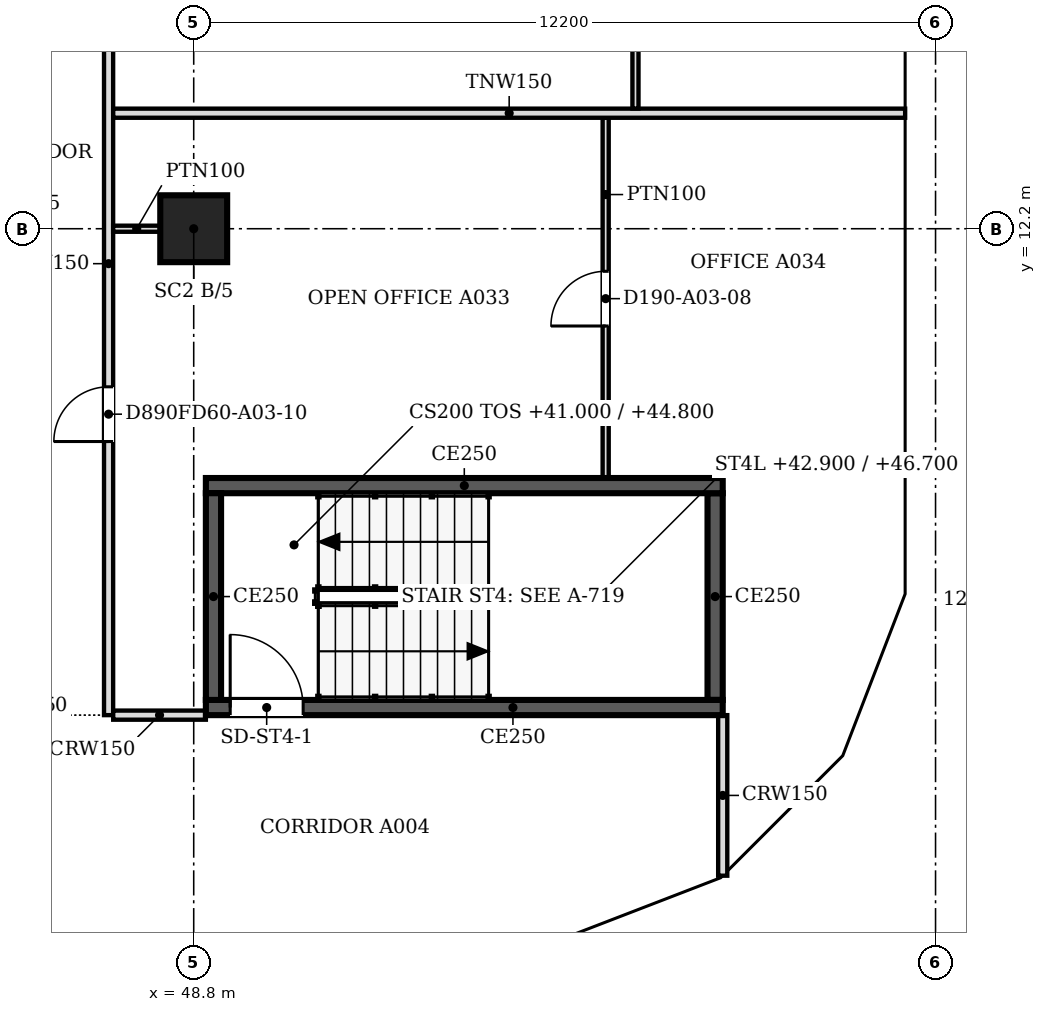
"""IFC4 building model, lengths in metres.
Left out: names, types, materials, properties, quantities, classifications, styles, units other than length and angle.
Written with IfcOpenShell. Run it as: python <this file> out.ifc"""

import sys

from ifc_helpers import new_model, si_unit, direction, frame, frame_2d, origin, origin_2d, place, context, subcontext, project, spatial, polyline, rectangle, outline, extrude, faceted_brep, source, transform, mapped, element, fill, save


model = new_model("IFC4")
c1 = context("Model", 3, precision=1e-05, world=origin(), true_north=direction((0.0, 1.0)))
c2 = subcontext(c1, "Body", "Model", "MODEL_VIEW")
j1 = project(units=[si_unit("LENGTHUNIT", "METRE"), si_unit("PLANEANGLEUNIT", "RADIAN")], contexts=[c1])
p1 = place(None, origin())
s1 = spatial("IfcSite", under=j1, at=p1, CompositionType="ELEMENT")
p2 = place(p1, origin())
s2 = spatial("IfcBuilding", under=s1, at=p2, CompositionType="ELEMENT")
p3 = place(p2, frame((0.0, 0.0, 41.0)))
s3 = spatial("IfcBuildingStorey", under=s2, at=p3, CompositionType="ELEMENT", Elevation=41.0)
p4 = place(p3, frame((48.8, 12.2, 0.0), z_axis=(0.0, 0.0, 1.0), x_axis=(1.0, 0.0, 0.0)))
e1 = element("IfcColumn", 1, at=p4, inside=s3, PredefinedType="COLUMN", context=c2, shape_type="SweptSolid", body=[
    extrude(rectangle(XDim=1.1, YDim=1.1, at=origin_2d()), origin(), (0.0, 0.0, 1.0), 3.6),
])
m1 = source(origin(), c2, "Body", "Brep", [
    faceted_brep([(0.047, -0.25, 0.0), (2.997, -0.25, 3.8), (0.047, -0.25, 7.6), (0.0, -0.25, 7.541), (0.0, -0.25, 0.059), (0.093, 0.25, 7.54), (2.944, 0.25, 3.868), (2.944, 0.25, 3.732), (0.093, 0.25, 0.06), (2.997, 0.0, 3.8), (0.047, 0.0, 0.0), (0.047, 0.0, 7.6)], [[[0, 1, 2, 3, 4]], [[5, 6, 7, 8]], [[8, 7, 9, 1, 0, 10]], [[6, 5, 11, 2, 1, 9]], [[3, 2, 11]], [[10, 0, 4]], [[8, 10, 4, 3, 11, 5]], [[9, 7, 6]]]),
])
p5 = place(p3, frame((54.81, 0.233, -3.8), z_axis=(0.0, 0.0, 1.0), x_axis=(0.932990326376, 0.359901446078, 0.0)))
e2 = element("IfcWall", 2, at=p5, inside=s3, PredefinedType="SOLIDWALL", context=c2, shape_type="MappedRepresentation", body=[
    mapped(m1, transform((0.0, 0.0, 0.0), scale=1.0)),
])
m2 = source(origin(), c2, "Body", "SweptSolid", [
    extrude(outline(polyline([(0.247, 0.665), (2.681, 3.8), (0.247, 6.935), (0.247, 0.665)])), frame((0.0, 0.26, 0.0), z_axis=(0.0, -1.0, 0.0), x_axis=(1.0, 0.0, 0.0)), (0.0, 0.0, 1.0), 0.52),
])
p6 = place(p5, origin())
e3 = element("IfcOpeningElement", 3, at=p6, cuts=e2, PredefinedType="OPENING", context=c2, shape_type="MappedRepresentation", body=[
    mapped(m2, transform((0.0, 0.0, 0.0), scale=1.0)),
])
m3 = source(origin(), c2, "Body", "Brep", [
    faceted_brep([(2.944, -0.25, 0.0), (2.997, -0.25, 0.068), (2.997, -0.25, 7.532), (2.944, -0.25, 7.6), (0.0, -0.25, 3.8), (0.053, 0.25, 3.868), (2.891, 0.25, 7.532), (2.891, 0.25, 0.068), (0.053, 0.25, 3.732), (2.944, 0.0, 0.0), (2.944, 0.0, 7.6), (0.0, 0.0, 3.8)], [[[0, 1, 2, 3, 4]], [[5, 6, 7, 8]], [[1, 0, 9]], [[10, 3, 2]], [[6, 5, 11, 4, 3, 10]], [[8, 7, 9, 0, 4, 11]], [[8, 11, 5]], [[1, 9, 7, 6, 10, 2]]]),
])
p7 = place(p3, frame((57.606, 1.312, -3.8), z_axis=(0.0, 0.0, 1.0), x_axis=(0.707147509625, 0.707066050402, 0.0)))
e4 = element("IfcWall", 4, at=p7, inside=s3, PredefinedType="SOLIDWALL", context=c2, shape_type="MappedRepresentation", body=[
    mapped(m3, transform((0.0, 0.0, 0.0), scale=1.0)),
])
m4 = source(origin(), c2, "Body", "SweptSolid", [
    extrude(outline(polyline([(2.744, 6.934), (0.316, 3.8), (2.744, 0.666), (2.744, 6.934)])), frame((0.0, 0.26, 0.0), z_axis=(0.0, -1.0, 0.0), x_axis=(1.0, 0.0, 0.0)), (0.0, 0.0, 1.0), 0.52),
])
p8 = place(p7, origin())
e5 = element("IfcOpeningElement", 5, at=p8, cuts=e4, PredefinedType="OPENING", context=c2, shape_type="MappedRepresentation", body=[
    mapped(m4, transform((0.0, 0.0, 0.0), scale=1.0)),
])
m5 = source(origin(), c2, "Body", "Brep", [
    faceted_brep([(0.053, -0.25, 0.0), (3.003, -0.25, 3.8), (0.053, -0.25, 7.6), (0.0, -0.25, 7.532), (0.0, -0.25, 0.068), (0.106, 0.25, 7.532), (2.957, 0.25, 3.86), (2.957, 0.25, 3.74), (0.106, 0.25, 0.068), (3.003, 0.0, 3.8), (0.053, 0.0, 0.0), (0.053, 0.0, 7.6)], [[[0, 1, 2, 3, 4]], [[5, 6, 7, 8]], [[8, 7, 9, 1, 0, 10]], [[6, 5, 11, 2, 1, 9]], [[3, 2, 11]], [[10, 0, 4]], [[8, 10, 4, 3, 11, 5]], [[9, 7, 6]]]),
])
p9 = place(p3, frame((59.669, 3.344, -3.8), z_axis=(0.0, 0.0, 1.0), x_axis=(0.35992665181, 0.932980602862, 0.0)))
e6 = element("IfcWall", 6, at=p9, inside=s3, PredefinedType="SOLIDWALL", context=c2, shape_type="MappedRepresentation", body=[
    mapped(m5, transform((0.0, 0.0, 0.0), scale=1.0)),
])
m6 = source(origin(), c2, "Body", "SweptSolid", [
    extrude(outline(polyline([(0.253, 0.665), (2.687, 3.8), (0.253, 6.935), (0.253, 0.665)])), frame((0.0, 0.26, 0.0), z_axis=(0.0, -1.0, 0.0), x_axis=(1.0, 0.0, 0.0)), (0.0, 0.0, 1.0), 0.52),
])
p10 = place(p9, origin())
e7 = element("IfcOpeningElement", 7, at=p10, cuts=e6, PredefinedType="OPENING", context=c2, shape_type="MappedRepresentation", body=[
    mapped(m6, transform((0.0, 0.0, 0.0), scale=1.0)),
])
m7 = source(origin(), c2, "Body", "Brep", [
    faceted_brep([(3.003, -0.25, 0.0), (6.053, -0.25, 3.8), (3.003, -0.25, 7.6), (0.0, -0.25, 3.8), (0.047, 0.25, 3.859), (3.003, 0.25, 7.6), (6.053, 0.25, 3.8), (3.003, 0.25, 0.0), (0.047, 0.25, 3.741), (0.0, 0.0, 3.8)], [[[0, 1, 2, 3]], [[4, 5, 6, 7, 8]], [[7, 6, 1, 0]], [[6, 5, 2, 1]], [[5, 4, 9, 3, 2]], [[8, 7, 0, 3, 9]], [[8, 9, 4]]]),
])
p11 = place(p3, frame((60.75, 6.146, -3.8), z_axis=(0.0, 0.0, 1.0), x_axis=(0.0, 1.0, 0.0)))
e8 = element("IfcWall", 8, at=p11, inside=s3, PredefinedType="SOLIDWALL", context=c2, shape_type="MappedRepresentation", body=[
    mapped(m7, transform((0.0, 0.0, 0.0), scale=1.0)),
])
m8 = source(origin(), c2, "Body", "SweptSolid", [
    extrude(outline(polyline([(3.005, 0.401), (5.733, 3.8), (3.005, 7.199), (0.319, 3.8), (3.005, 0.401)])), frame((0.0, 0.26, 0.0), z_axis=(0.0, -1.0, 0.0), x_axis=(1.0, 0.0, 0.0)), (0.0, 0.0, 1.0), 0.52),
])
p12 = place(p11, origin())
e9 = element("IfcOpeningElement", 9, at=p12, cuts=e8, PredefinedType="OPENING", context=c2, shape_type="MappedRepresentation", body=[
    mapped(m8, transform((0.0, 0.0, 0.0), scale=1.0)),
])
m9 = source(origin(), c2, "Body", "SweptSolid", [
    extrude(outline(polyline([(3.05, 0.0), (6.1, 3.8), (3.05, 7.6), (0.0, 3.8), (3.05, 0.0)])), frame((0.0, 0.25, 0.0), z_axis=(0.0, -1.0, 0.0), x_axis=(1.0, 0.0, 0.0)), (0.0, 0.0, 1.0), 0.5),
])
p13 = place(p3, frame((60.75, 12.2, -3.8), z_axis=(0.0, 0.0, 1.0), x_axis=(0.0, 1.0, 0.0)))
e10 = element("IfcWall", 10, at=p13, inside=s3, PredefinedType="SOLIDWALL", context=c2, shape_type="MappedRepresentation", body=[
    mapped(m9, transform((0.0, 0.0, 0.0), scale=1.0)),
])
m10 = source(origin(), c2, "Body", "SweptSolid", [
    extrude(outline(polyline([(3.05, 0.399), (5.78, 3.8), (3.05, 7.201), (0.321, 3.8), (3.05, 0.399)])), frame((0.0, 0.26, 0.0), z_axis=(0.0, -1.0, 0.0), x_axis=(1.0, 0.0, 0.0)), (0.0, 0.0, 1.0), 0.52),
])
p14 = place(p13, origin())
e11 = element("IfcOpeningElement", 11, at=p14, cuts=e10, PredefinedType="OPENING", context=c2, shape_type="MappedRepresentation", body=[
    mapped(m10, transform((0.0, 0.0, 0.0), scale=1.0)),
])
p15 = place(p2, frame((0.0, 0.0, 44.8)))
s4 = spatial("IfcBuildingStorey", under=s2, at=p15, CompositionType="ELEMENT", Elevation=44.8)
m11 = source(origin(), c2, "Body", "Brep", [
    faceted_brep([(2.95, -0.25, 0.0), (3.003, -0.25, 0.068), (3.003, -0.25, 7.532), (2.95, -0.25, 7.6), (0.0, -0.25, 3.8), (0.047, 0.25, 3.86), (2.898, 0.25, 7.532), (2.898, 0.25, 0.068), (0.047, 0.25, 3.74), (2.95, 0.0, 0.0), (2.95, 0.0, 7.6), (0.0, 0.0, 3.8)], [[[0, 1, 2, 3, 4]], [[5, 6, 7, 8]], [[1, 0, 9]], [[10, 3, 2]], [[6, 5, 11, 4, 3, 10]], [[8, 7, 9, 0, 4, 11]], [[8, 11, 5]], [[1, 9, 7, 6, 10, 2]]]),
])
p16 = place(p15, frame((54.854, 0.25, -3.8), z_axis=(0.0, 0.0, 1.0), x_axis=(0.932970071518, 0.359953949349, 0.0)))
e12 = element("IfcWall", 12, at=p16, inside=s4, PredefinedType="SOLIDWALL", context=c2, shape_type="MappedRepresentation", body=[
    mapped(m11, transform((0.0, 0.0, 0.0), scale=1.0)),
])
m12 = source(origin(), c2, "Body", "SweptSolid", [
    extrude(outline(polyline([(2.75, 6.935), (0.316, 3.8), (2.75, 0.665), (2.75, 6.935)])), frame((0.0, 0.26, 0.0), z_axis=(0.0, -1.0, 0.0), x_axis=(1.0, 0.0, 0.0)), (0.0, 0.0, 1.0), 0.52),
])
p17 = place(p16, origin())
e13 = element("IfcOpeningElement", 13, at=p17, cuts=e12, PredefinedType="OPENING", context=c2, shape_type="MappedRepresentation", body=[
    mapped(m12, transform((0.0, 0.0, 0.0), scale=1.0)),
])
m13 = source(origin(), c2, "Body", "Brep", [
    faceted_brep([(0.053, -0.25, 0.0), (2.997, -0.25, 3.8), (0.053, -0.25, 7.6), (0.0, -0.25, 7.532), (0.0, -0.25, 0.068), (0.106, 0.25, 7.532), (2.944, 0.25, 3.868), (2.944, 0.25, 3.732), (0.106, 0.25, 0.068), (2.997, 0.0, 3.8), (0.053, 0.0, 0.0), (0.053, 0.0, 7.6)], [[[0, 1, 2, 3, 4]], [[5, 6, 7, 8]], [[8, 7, 9, 1, 0, 10]], [[6, 5, 11, 2, 1, 9]], [[3, 2, 11]], [[10, 0, 4]], [[8, 10, 4, 3, 11, 5]], [[9, 7, 6]]]),
])
p18 = place(p15, frame((57.569, 1.274, -3.8), z_axis=(0.0, 0.0, 1.0), x_axis=(0.707066050402, 0.707147509625, 0.0)))
e14 = element("IfcWall", 14, at=p18, inside=s4, PredefinedType="SOLIDWALL", context=c2, shape_type="MappedRepresentation", body=[
    mapped(m13, transform((0.0, 0.0, 0.0), scale=1.0)),
])
m14 = source(origin(), c2, "Body", "SweptSolid", [
    extrude(outline(polyline([(0.253, 0.666), (2.681, 3.8), (0.253, 6.934), (0.253, 0.666)])), frame((0.0, 0.26, 0.0), z_axis=(0.0, -1.0, 0.0), x_axis=(1.0, 0.0, 0.0)), (0.0, 0.0, 1.0), 0.52),
])
p19 = place(p18, origin())
e15 = element("IfcOpeningElement", 15, at=p19, cuts=e14, PredefinedType="OPENING", context=c2, shape_type="MappedRepresentation", body=[
    mapped(m14, transform((0.0, 0.0, 0.0), scale=1.0)),
])
m15 = source(origin(), c2, "Body", "Brep", [
    faceted_brep([(2.95, -0.25, 0.0), (2.997, -0.25, 0.059), (2.997, -0.25, 7.541), (2.95, -0.25, 7.6), (0.0, -0.25, 3.8), (0.053, 0.25, 3.868), (2.904, 0.25, 7.54), (2.904, 0.25, 0.06), (0.053, 0.25, 3.732), (2.95, 0.0, 0.0), (2.95, 0.0, 7.6), (0.0, 0.0, 3.8)], [[[0, 1, 2, 3, 4]], [[5, 6, 7, 8]], [[1, 0, 9]], [[10, 3, 2]], [[6, 5, 11, 4, 3, 10]], [[8, 7, 9, 0, 4, 11]], [[8, 11, 5]], [[1, 9, 7, 6, 10, 2]]]),
])
p20 = place(p15, frame((59.688, 3.394, -3.8), z_axis=(0.0, 0.0, 1.0), x_axis=(0.359972353723, 0.932962970624, 0.0)))
e16 = element("IfcWall", 16, at=p20, inside=s4, PredefinedType="SOLIDWALL", context=c2, shape_type="MappedRepresentation", body=[
    mapped(m15, transform((0.0, 0.0, 0.0), scale=1.0)),
])
p21 = place(p20, origin())
e17 = element("IfcOpeningElement", 17, at=p21, cuts=e16, PredefinedType="OPENING", context=c2, shape_type="MappedRepresentation", body=[
    mapped(m12, transform((0.0, 0.0, 0.0), scale=1.0)),
])
m16 = source(origin(), c2, "Body", "Brep", [
    faceted_brep([(0.047, -0.25, 0.0), (3.05, -0.25, 3.8), (0.047, -0.25, 7.6), (0.0, -0.25, 7.54), (0.0, -0.25, 0.06), (0.093, 0.25, 7.541), (3.05, 0.25, 3.8), (0.093, 0.25, 0.059), (0.047, 0.0, 0.0), (0.047, 0.0, 7.6)], [[[0, 1, 2, 3, 4]], [[5, 6, 7]], [[7, 6, 1, 0, 8]], [[6, 5, 9, 2, 1]], [[3, 2, 9]], [[8, 0, 4]], [[7, 8, 4, 3, 9, 5]]]),
])
p22 = place(p15, frame((60.75, 6.1, -3.8), z_axis=(0.0, 0.0, 1.0), x_axis=(0.0, 1.0, 0.0)))
e18 = element("IfcWall", 18, at=p22, inside=s4, PredefinedType="SOLIDWALL", context=c2, shape_type="MappedRepresentation", body=[
    mapped(m16, transform((0.0, 0.0, 0.0), scale=1.0)),
])
m17 = source(origin(), c2, "Body", "SweptSolid", [
    extrude(outline(polyline([(0.247, 0.656), (2.731, 3.8), (0.247, 6.944), (0.247, 0.656)])), frame((0.0, 0.26, 0.0), z_axis=(0.0, -1.0, 0.0), x_axis=(1.0, 0.0, 0.0)), (0.0, 0.0, 1.0), 0.52),
])
p23 = place(p22, origin())
e19 = element("IfcOpeningElement", 19, at=p23, cuts=e18, PredefinedType="OPENING", context=c2, shape_type="MappedRepresentation", body=[
    mapped(m17, transform((0.0, 0.0, 0.0), scale=1.0)),
])
p24 = place(p15, frame((60.75, 9.15, -3.8), z_axis=(0.0, 0.0, 1.0), x_axis=(0.0, 1.0, 0.0)))
e20 = element("IfcWall", 20, at=p24, inside=s4, PredefinedType="SOLIDWALL", context=c2, shape_type="MappedRepresentation", body=[
    mapped(m9, transform((0.0, 0.0, 0.0), scale=1.0)),
])
p25 = place(p24, origin())
e21 = element("IfcOpeningElement", 21, at=p25, cuts=e20, PredefinedType="OPENING", context=c2, shape_type="MappedRepresentation", body=[
    mapped(m10, transform((0.0, 0.0, 0.0), scale=1.0)),
])
p26 = place(p3, frame((57.5, 4.325, 0.0), z_axis=(0.0, 0.0, 1.0), x_axis=(-1.0, 0.0, 0.0)))
e22 = element("IfcWall", 22, at=p26, inside=s3, PredefinedType="SOLIDWALL", context=c2, shape_type="SweptSolid", body=[
    extrude(rectangle(XDim=8.5, YDim=0.25, at=frame_2d((4.25, 0.0))), origin(), (0.0, 0.0, 1.0), 3.8),
])
m18 = source(origin(), c2, "Body", "SweptSolid", [
    extrude(rectangle(XDim=1.2, YDim=2.1, at=frame_2d((0.6, 1.05))), frame((0.0, 0.135, 0.0), z_axis=(0.0, -1.0, 0.0), x_axis=(1.0, 0.0, 0.0)), (0.0, 0.0, 1.0), 0.27),
])
p27 = place(p26, frame((6.9, 0.0, 0.0)))
e23 = element("IfcOpeningElement", 23, at=p27, cuts=e22, PredefinedType="OPENING", context=c2, shape_type="MappedRepresentation", body=[
    mapped(m18, transform((0.0, 0.0, 0.0), scale=1.0)),
])
p28 = place(p3, frame((49.125, 4.45, 0.0), z_axis=(0.0, 0.0, 1.0), x_axis=(0.0, 1.0, 0.0)))
e24 = element("IfcWall", 24, at=p28, inside=s3, PredefinedType="SOLIDWALL", context=c2, shape_type="SweptSolid", body=[
    extrude(rectangle(XDim=3.4, YDim=0.25, at=frame_2d((1.7, 0.0))), origin(), (0.0, 0.0, 1.0), 3.8),
])
p29 = place(p3, frame((49.0, 7.975, 0.0), z_axis=(0.0, 0.0, 1.0), x_axis=(1.0, 0.0, 0.0)))
e25 = element("IfcWall", 25, at=p29, inside=s3, PredefinedType="SOLIDWALL", context=c2, shape_type="SweptSolid", body=[
    extrude(rectangle(XDim=8.5, YDim=0.25, at=frame_2d((4.25, 0.0))), origin(), (0.0, 0.0, 1.0), 3.8),
])
p30 = place(p3, frame((57.375, 7.85, 0.0), z_axis=(0.0, 0.0, 1.0), x_axis=(0.0, -1.0, 0.0)))
e26 = element("IfcWall", 26, at=p30, inside=s3, PredefinedType="SOLIDWALL", context=c2, shape_type="SweptSolid", body=[
    extrude(rectangle(XDim=3.4, YDim=0.25, at=frame_2d((1.7, 0.0))), origin(), (0.0, 0.0, 1.0), 3.8),
])
p31 = place(p3, frame((57.5, 1.559, 0.0), z_axis=(0.0, 0.0, 1.0), x_axis=(0.0, 1.0, 0.0)))
e27 = element("IfcWall", 27, at=p31, inside=s3, PredefinedType="PARTITIONING", context=c2, shape_type="SweptSolid", body=[
    extrude(rectangle(XDim=2.641, YDim=0.15, at=frame_2d((1.32, 0.0))), origin(), (0.0, 0.0, 1.0), 3.067),
])
p32 = place(p3, frame((47.4, 22.224, 0.0), z_axis=(0.0, 0.0, 1.0), x_axis=(0.0, -1.0, 0.0)))
e28 = element("IfcWall", 28, at=p32, inside=s3, PredefinedType="PARTITIONING", context=c2, shape_type="SweptSolid", body=[
    extrude(rectangle(XDim=18.024, YDim=0.15, at=frame_2d((9.012, 0.0))), origin(), (0.0, 0.0, 1.0), 3.067),
])
m19 = source(origin(), c2, "Body", "SweptSolid", [
    extrude(rectangle(XDim=0.9, YDim=2.1, at=frame_2d((0.45, 1.05))), frame((0.0, 0.085, 0.0), z_axis=(0.0, -1.0, 0.0), x_axis=(1.0, 0.0, 0.0)), (0.0, 0.0, 1.0), 0.17),
])
p33 = place(p32, frame((3.623, 0.0, 0.0)))
e29 = element("IfcOpeningElement", 29, at=p33, cuts=e28, PredefinedType="OPENING", context=c2, shape_type="MappedRepresentation", body=[
    mapped(m19, transform((0.0, 0.0, 0.0), scale=1.0)),
])
p34 = place(p32, frame((12.624, 0.0, 0.0)))
e30 = element("IfcOpeningElement", 30, at=p34, cuts=e28, PredefinedType="OPENING", context=c2, shape_type="MappedRepresentation", body=[
    mapped(m19, transform((0.0, 0.0, 0.0), scale=1.0)),
])
p35 = place(p3, frame((47.476, 4.2, 0.0), z_axis=(0.0, 0.0, 1.0), x_axis=(1.0, 0.0, 0.0)))
e31 = element("IfcWall", 31, at=p35, inside=s3, PredefinedType="PARTITIONING", context=c2, shape_type="SweptSolid", body=[
    extrude(rectangle(XDim=1.524, YDim=0.15, at=frame_2d((0.762, 0.0))), origin(), (0.0, 0.0, 1.0), 3.067),
])
p36 = place(p3, frame((55.575, 14.024, 0.0), z_axis=(0.0, 0.0, 1.0), x_axis=(0.0, -1.0, 0.0)))
e32 = element("IfcWall", 32, at=p36, inside=s3, PredefinedType="PARTITIONING", context=c2, shape_type="SweptSolid", body=[
    extrude(rectangle(XDim=5.924, YDim=0.1, at=frame_2d((2.962, 0.0))), origin(), (0.0, 0.0, 1.0), 3.067),
])
m20 = source(origin(), c2, "Body", "SweptSolid", [
    extrude(rectangle(XDim=0.9, YDim=2.1, at=frame_2d((0.45, 1.05))), frame((0.0, 0.06, 0.0), z_axis=(0.0, -1.0, 0.0), x_axis=(1.0, 0.0, 0.0)), (0.0, 0.0, 1.0), 0.12),
])
p37 = place(p36, frame((2.524, 0.0, 0.0)))
e33 = element("IfcOpeningElement", 33, at=p37, cuts=e32, PredefinedType="OPENING", context=c2, shape_type="MappedRepresentation", body=[
    mapped(m20, transform((0.0, 0.0, 0.0), scale=1.0)),
])
p38 = place(p3, frame((48.25, 12.2, 0.0), z_axis=(0.0, 0.0, 1.0), x_axis=(-1.0, 0.0, 0.0)))
e34 = element("IfcWall", 34, at=p38, inside=s3, PredefinedType="PARTITIONING", context=c2, shape_type="SweptSolid", body=[
    extrude(rectangle(XDim=0.775, YDim=0.1, at=frame_2d((0.387, 0.0))), origin(), (0.0, 0.0, 1.0), 3.067),
])
p39 = place(p3, frame((47.476, 14.1, 0.0), z_axis=(0.0, 0.0, 1.0), x_axis=(1.0, 0.0, 0.0)))
e35 = element("IfcWall", 35, at=p39, inside=s3, PredefinedType="PARTITIONING", context=c2, shape_type="SweptSolid", body=[
    extrude(rectangle(XDim=13.024, YDim=0.15, at=frame_2d((6.512, 0.0))), origin(), (0.0, 0.0, 1.0), 3.067),
])
p40 = place(p3, frame((56.065, 22.224, 0.0), z_axis=(0.0, 0.0, 1.0), x_axis=(0.0, -1.0, 0.0)))
e36 = element("IfcWall", 36, at=p40, inside=s3, PredefinedType="PARTITIONING", context=c2, shape_type="SweptSolid", body=[
    extrude(rectangle(XDim=8.048, YDim=0.1, at=frame_2d((4.024, 0.0))), origin(), (0.0, 0.0, 1.0), 3.067),
])
p41 = place(p40, frame((3.548, 0.0, 0.0)))
e37 = element("IfcOpeningElement", 37, at=p41, cuts=e36, PredefinedType="OPENING", context=c2, shape_type="MappedRepresentation", body=[
    mapped(m20, transform((0.0, 0.0, 0.0), scale=1.0)),
])
m21 = source(origin(), c2, "Body", "SweptSolid", [
    extrude(rectangle(XDim=1.2, YDim=2.1, at=frame_2d((0.6, 1.05))), frame((0.0, 0.025, 0.0), z_axis=(0.0, -1.0, 0.0), x_axis=(1.0, 0.0, 0.0)), (0.0, 0.0, 1.0), 0.05),
])
p42 = place(p27, origin())
e38 = element("IfcDoor", 38, at=p42, inside=s3, OperationType="SINGLE_SWING_RIGHT", PredefinedType="DOOR", context=c2, shape_type="MappedRepresentation", body=[
    mapped(m21, transform((0.0, 0.0, 0.0), scale=1.0)),
])
fill(e23, e38)
m22 = source(origin(), c2, "Body", "SweptSolid", [
    extrude(rectangle(XDim=0.9, YDim=2.1, at=frame_2d((0.45, 1.05))), frame((0.0, 0.025, 0.0), z_axis=(0.0, -1.0, 0.0), x_axis=(1.0, 0.0, 0.0)), (0.0, 0.0, 1.0), 0.05),
])
p43 = place(p37, origin())
e39 = element("IfcDoor", 39, at=p43, inside=s3, OperationType="SINGLE_SWING_RIGHT", PredefinedType="DOOR", context=c2, shape_type="MappedRepresentation", body=[
    mapped(m22, transform((0.0, 0.0, 0.0), scale=1.0)),
])
fill(e33, e39)
p44 = place(p34, origin())
e40 = element("IfcDoor", 40, at=p44, inside=s3, OperationType="SINGLE_SWING_RIGHT", PredefinedType="DOOR", context=c2, shape_type="MappedRepresentation", body=[
    mapped(m22, transform((0.0, 0.0, 0.0), scale=1.0)),
])
fill(e30, e40)
save(model, sys.argv[1])
